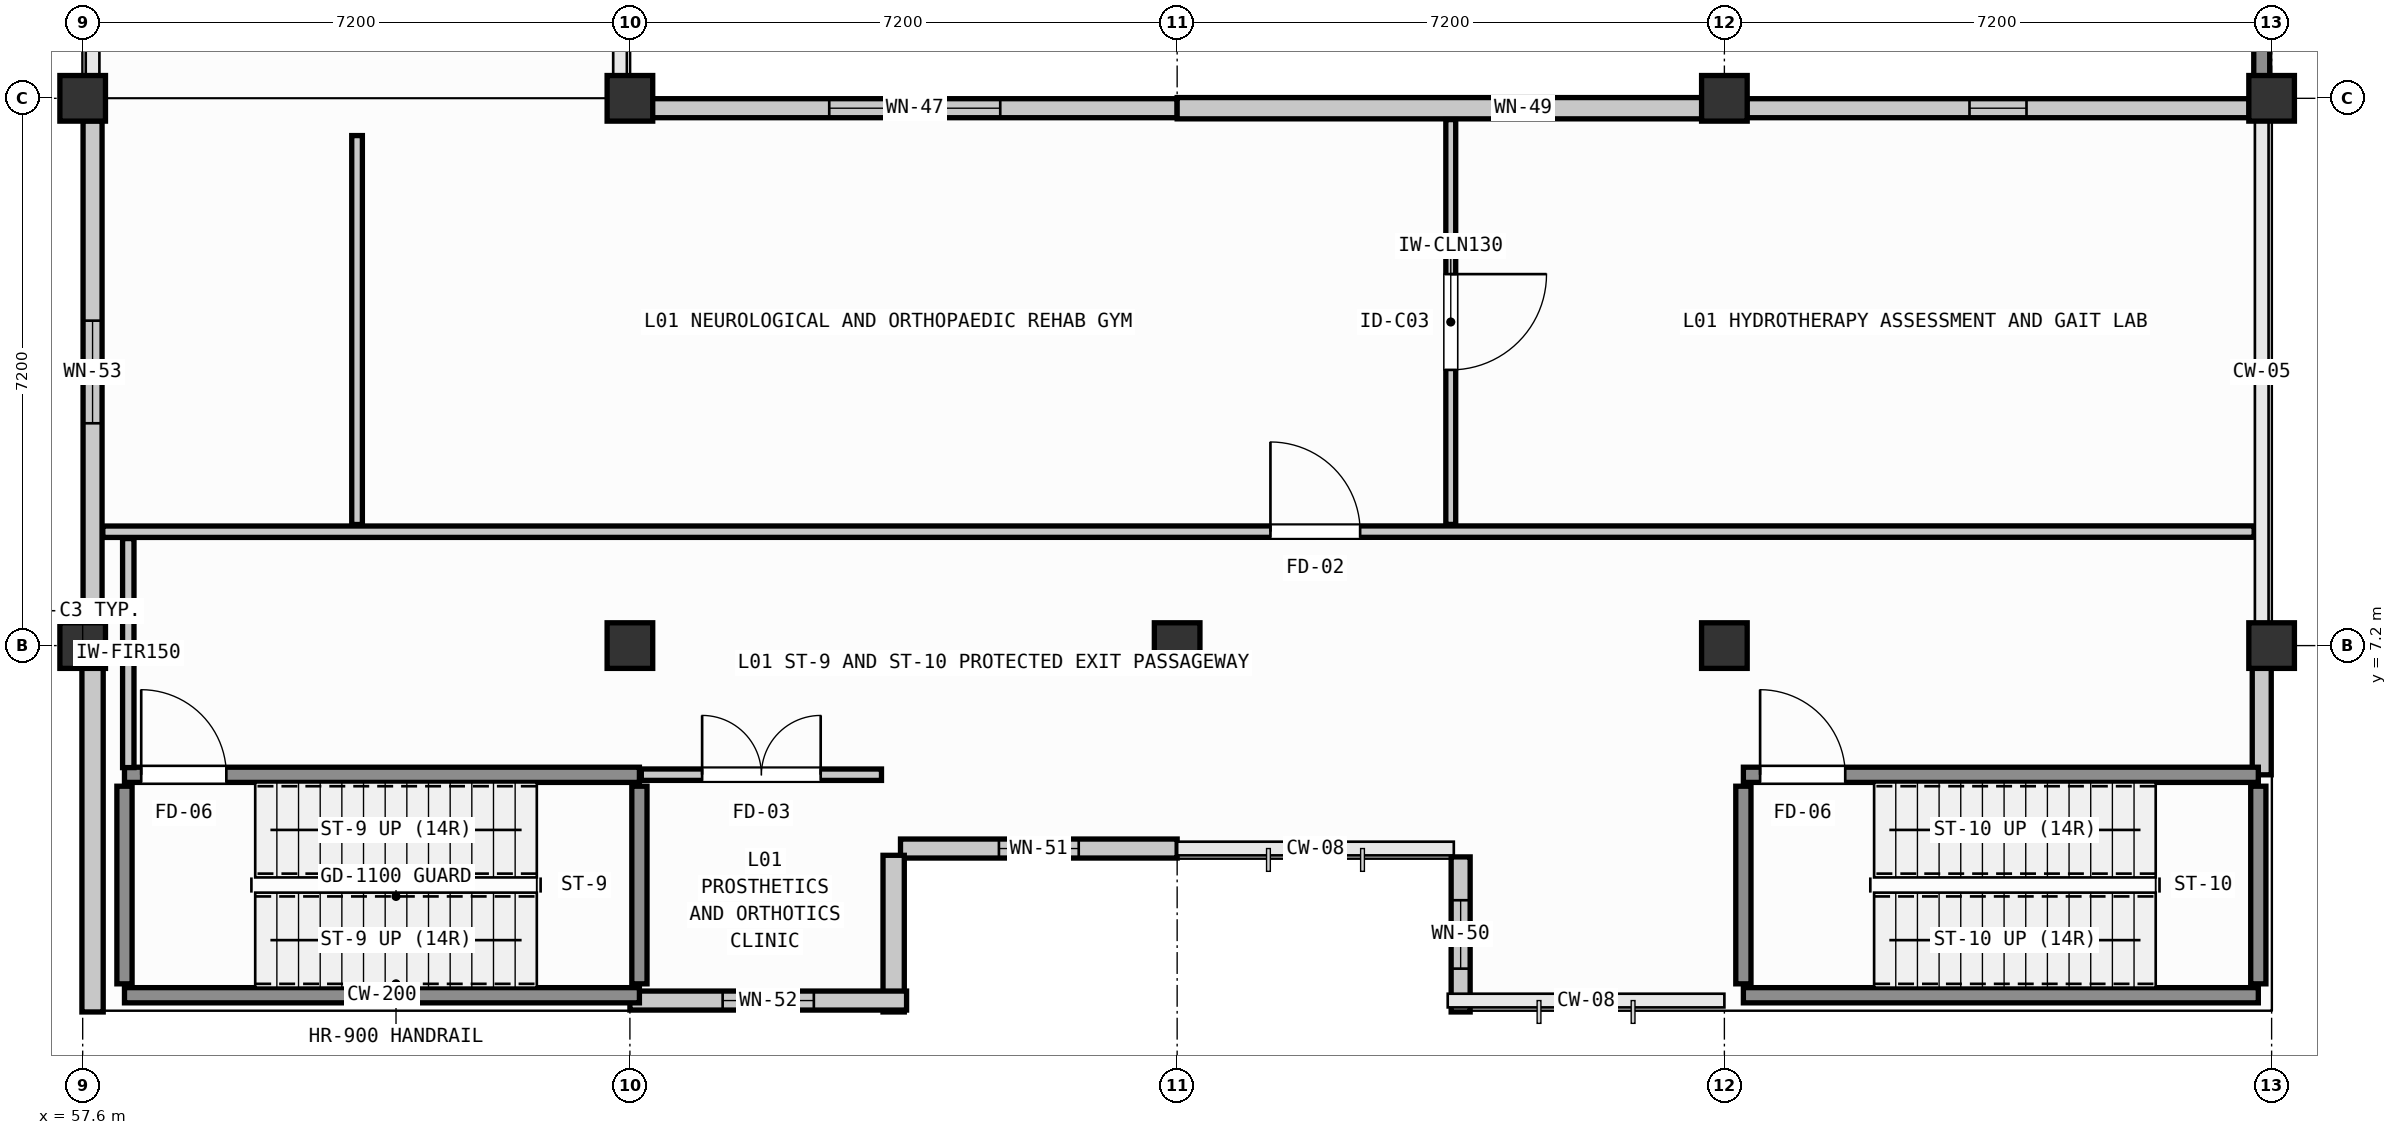
"""IFC4 building model, lengths in metres.
Left out: names, types, materials, properties, quantities, classifications, styles, units other than length and angle.
Written with IfcOpenShell. Run it as: python <this file> out.ifc"""

import sys

from ifc_helpers import new_model, si_unit, direction, frame, frame_2d, origin, origin_2d, place, context, subcontext, project, spatial, rectangle, extrude, element, fill, save


model = new_model("IFC4")
c1 = context("Model", 3, precision=1e-05, world=origin(), true_north=direction((0.0, 1.0)))
c2 = subcontext(c1, "Body", "Model", "MODEL_VIEW")
j1 = project(units=[si_unit("LENGTHUNIT", "METRE"), si_unit("PLANEANGLEUNIT", "RADIAN")], contexts=[c1])
p1 = place(None, origin())
s1 = spatial("IfcSite", under=j1, at=p1, CompositionType="ELEMENT")
p2 = place(p1, origin())
s2 = spatial("IfcBuilding", under=s1, at=p2, CompositionType="ELEMENT")
p3 = place(p2, origin())
s3 = spatial("IfcBuildingStorey", under=s2, at=p3, CompositionType="ELEMENT", Elevation=0.0)
for number, where, z_axis, x_axis in (
    (1, (57.6, 7.2, -0.25), (0.0, 0.0, 1.0), (1.0, 0.0, 0.0)),
    (2, (57.6, 14.4, -0.25), (0.0, 0.0, 1.0), (1.0, 0.0, 0.0)),
    (3, (64.8, 7.2, -0.25), (0.0, 0.0, 1.0), (1.0, 0.0, 0.0)),
    (4, (64.8, 14.4, -0.25), (0.0, 0.0, 1.0), (1.0, 0.0, 0.0)),
    (5, (72.0, 7.2, -0.25), (0.0, 0.0, 1.0), (1.0, 0.0, 0.0)),
    (6, (79.2, 7.2, -0.25), (0.0, 0.0, 1.0), (1.0, 0.0, 0.0)),
    (7, (79.2, 14.4, -0.25), (0.0, 0.0, 1.0), (1.0, 0.0, 0.0)),
    (8, (86.4, 7.2, -0.25), (0.0, 0.0, 1.0), (1.0, 0.0, 0.0)),
    (9, (86.4, 14.4, -0.25), (0.0, 0.0, 1.0), (1.0, 0.0, 0.0)),
):
    element("IfcColumn", number, at=place(p3, frame(where, z_axis=z_axis, x_axis=x_axis)), inside=s3, PredefinedType="COLUMN", context=c2, shape_type="SweptSolid", body=[
        extrude(rectangle(XDim=0.6, YDim=0.6, at=origin_2d()), origin(), (0.0, 0.0, 1.0), 4.865),
    ])
p4 = place(p3, frame((65.095, 14.27, 0.0), z_axis=(0.0, 0.0, 1.0), x_axis=(1.0, 0.0, 0.0)))
e10 = element("IfcWall", 10, at=p4, inside=s3, PredefinedType="SOLIDWALL", context=c2, shape_type="SweptSolid", body=[
    extrude(rectangle(XDim=6.905, YDim=0.25, at=frame_2d((3.453, 0.0))), origin(), (0.0, 0.0, 1.0), 3.915),
])
p5 = place(p4, frame((2.327, 0.0, 0.95)))
e11 = element("IfcOpeningElement", 11, at=p5, cuts=e10, PredefinedType="OPENING", context=c2, shape_type="SweptSolid", body=[
    extrude(rectangle(XDim=2.25, YDim=1.55, at=frame_2d((1.125, 0.775))), frame((0.0, 0.135, 0.0), z_axis=(0.0, -1.0, 0.0), x_axis=(1.0, 0.0, 0.0)), (0.0, 0.0, 1.0), 0.27),
])
p6 = place(p3, frame((72.0, 14.27, 0.0), z_axis=(0.0, 0.0, 1.0), x_axis=(1.0, 0.0, 0.0)))
e12 = element("IfcWall", 12, at=p6, inside=s3, PredefinedType="SOLIDWALL", context=c2, shape_type="SweptSolid", body=[
    extrude(rectangle(XDim=6.905, YDim=0.28, at=frame_2d((3.453, 0.0))), origin(), (0.0, 0.0, 1.0), 3.915),
])
p7 = place(p6, frame((4.177, 0.0, 0.95)))
e13 = element("IfcOpeningElement", 13, at=p7, cuts=e12, PredefinedType="OPENING", context=c2, shape_type="SweptSolid", body=[
    extrude(rectangle(XDim=0.75, YDim=1.85, at=frame_2d((0.375, 0.925))), frame((0.0, 0.15, 0.0), z_axis=(0.0, -1.0, 0.0), x_axis=(1.0, 0.0, 0.0)), (0.0, 0.0, 1.0), 0.3),
])
p8 = place(p3, frame((79.495, 14.27, 0.0), z_axis=(0.0, 0.0, 1.0), x_axis=(1.0, 0.0, 0.0)))
e14 = element("IfcWall", 14, at=p8, inside=s3, PredefinedType="SOLIDWALL", context=c2, shape_type="SweptSolid", body=[
    extrude(rectangle(XDim=6.61, YDim=0.25, at=frame_2d((3.305, 0.0))), origin(), (0.0, 0.0, 1.0), 3.815),
])
p9 = place(p8, frame((2.93, 0.0, 0.95)))
e15 = element("IfcOpeningElement", 15, at=p9, cuts=e14, PredefinedType="OPENING", context=c2, shape_type="SweptSolid", body=[
    extrude(rectangle(XDim=0.75, YDim=1.85, at=frame_2d((0.375, 0.925))), frame((0.0, 0.135, 0.0), z_axis=(0.0, -1.0, 0.0), x_axis=(1.0, 0.0, 0.0)), (0.0, 0.0, 1.0), 0.27),
])
p10 = place(p3, frame((86.27, 6.905, 0.0), z_axis=(0.0, 0.0, 1.0), x_axis=(0.0, -1.0, 0.0)))
e16 = element("IfcWall", 16, at=p10, inside=s3, PredefinedType="SOLIDWALL", context=c2, shape_type="SweptSolid", body=[
    extrude(rectangle(XDim=1.405, YDim=0.25, at=frame_2d((0.703, 0.0))), origin(), (0.0, 0.0, 1.0), 3.815),
])
p11 = place(p3, frame((75.73, 2.38, 0.0), z_axis=(0.0, 0.0, 1.0), x_axis=(0.0, 1.0, 0.0)))
e17 = element("IfcWall", 17, at=p11, inside=s3, PredefinedType="SOLIDWALL", context=c2, shape_type="SweptSolid", body=[
    extrude(rectangle(XDim=2.04, YDim=0.25, at=frame_2d((1.02, 0.0))), origin(), (0.0, 0.0, 1.0), 4.57),
])
p12 = place(p11, frame((0.57, 0.0, 0.95)))
e18 = element("IfcOpeningElement", 18, at=p12, cuts=e17, PredefinedType="OPENING", context=c2, shape_type="SweptSolid", body=[
    extrude(rectangle(XDim=0.9, YDim=1.85, at=frame_2d((0.45, 0.925))), frame((0.0, 0.135, 0.0), z_axis=(0.0, -1.0, 0.0), x_axis=(1.0, 0.0, 0.0)), (0.0, 0.0, 1.0), 0.27),
])
p13 = place(p3, frame((72.0, 4.53, 0.0), z_axis=(0.0, 0.0, 1.0), x_axis=(-1.0, 0.0, 0.0)))
e19 = element("IfcWall", 19, at=p13, inside=s3, PredefinedType="SOLIDWALL", context=c2, shape_type="SweptSolid", body=[
    extrude(rectangle(XDim=3.64, YDim=0.25, at=frame_2d((1.82, 0.0))), origin(), (0.0, 0.0, 1.0), 4.57),
])
p14 = place(p13, frame((1.295, 0.0, 0.95)))
e20 = element("IfcOpeningElement", 20, at=p14, cuts=e19, PredefinedType="OPENING", context=c2, shape_type="SweptSolid", body=[
    extrude(rectangle(XDim=1.05, YDim=1.85, at=frame_2d((0.525, 0.925))), frame((0.0, 0.135, 0.0), z_axis=(0.0, -1.0, 0.0), x_axis=(1.0, 0.0, 0.0)), (0.0, 0.0, 1.0), 0.27),
])
p15 = place(p3, frame((68.27, 4.441, 0.0), z_axis=(0.0, 0.0, 1.0), x_axis=(0.0, -1.0, 0.0)))
e21 = element("IfcWall", 21, at=p15, inside=s3, PredefinedType="SOLIDWALL", context=c2, shape_type="SweptSolid", body=[
    extrude(rectangle(XDim=2.061, YDim=0.28, at=frame_2d((1.031, 0.0))), origin(), (0.0, 0.0, 1.0), 4.57),
])
p16 = place(p3, frame((68.44, 2.53, 0.0), z_axis=(0.0, 0.0, 1.0), x_axis=(-1.0, 0.0, 0.0)))
e22 = element("IfcWall", 22, at=p16, inside=s3, PredefinedType="SOLIDWALL", context=c2, shape_type="SweptSolid", body=[
    extrude(rectangle(XDim=3.64, YDim=0.25, at=frame_2d((1.82, 0.0))), origin(), (0.0, 0.0, 1.0), 4.57),
])
p17 = place(p16, frame((1.22, 0.0, 0.95)))
e23 = element("IfcOpeningElement", 23, at=p17, cuts=e22, PredefinedType="OPENING", context=c2, shape_type="SweptSolid", body=[
    extrude(rectangle(XDim=1.2, YDim=1.85, at=frame_2d((0.6, 0.925))), frame((0.0, 0.135, 0.0), z_axis=(0.0, -1.0, 0.0), x_axis=(1.0, 0.0, 0.0)), (0.0, 0.0, 1.0), 0.27),
])
p18 = place(p3, frame((57.73, 2.38, 0.0), z_axis=(0.0, 0.0, 1.0), x_axis=(0.0, 1.0, 0.0)))
e24 = element("IfcWall", 24, at=p18, inside=s3, PredefinedType="SOLIDWALL", context=c2, shape_type="SweptSolid", body=[
    extrude(rectangle(XDim=4.525, YDim=0.28, at=frame_2d((2.263, 0.0))), origin(), (0.0, 0.0, 1.0), 3.815),
])
p19 = place(p3, frame((57.73, 7.495, 0.0), z_axis=(0.0, 0.0, 1.0), x_axis=(0.0, 1.0, 0.0)))
e25 = element("IfcWall", 25, at=p19, inside=s3, PredefinedType="SOLIDWALL", context=c2, shape_type="SweptSolid", body=[
    extrude(rectangle(XDim=6.61, YDim=0.25, at=frame_2d((3.305, 0.0))), origin(), (0.0, 0.0, 1.0), 3.815),
])
p20 = place(p19, frame((2.63, 0.0, 0.95)))
e26 = element("IfcOpeningElement", 26, at=p20, cuts=e25, PredefinedType="OPENING", context=c2, shape_type="SweptSolid", body=[
    extrude(rectangle(XDim=1.35, YDim=1.85, at=frame_2d((0.675, 0.925))), frame((0.0, 0.135, 0.0), z_axis=(0.0, -1.0, 0.0), x_axis=(1.0, 0.0, 0.0)), (0.0, 0.0, 1.0), 0.27),
])
p21 = place(p3, frame((86.27, 14.5, 0.0), z_axis=(0.0, 0.0, 1.0), x_axis=(0.0, 1.0, 0.0)))
e27 = element("IfcWall", 27, at=p21, inside=s3, PredefinedType="SOLIDWALL", context=c2, shape_type="SweptSolid", body=[
    extrude(rectangle(XDim=5.24, YDim=0.21, at=frame_2d((2.62, 0.0))), origin(), (0.0, 0.0, 1.0), 2.35),
])
p22 = place(p21, frame((1.82, 0.0, 0.0)))
e28 = element("IfcOpeningElement", 28, at=p22, cuts=e27, PredefinedType="OPENING", context=c2, shape_type="SweptSolid", body=[
    extrude(rectangle(XDim=1.6, YDim=2.05, at=frame_2d((0.8, 1.025))), frame((0.0, 0.115, 0.0), z_axis=(0.0, -1.0, 0.0), x_axis=(1.0, 0.0, 0.0)), (0.0, 0.0, 1.0), 0.23),
])
p23 = place(p3, frame((58.15, 2.6, -0.25), z_axis=(0.0, 0.0, 1.0), x_axis=(1.0, 0.0, 0.0)))
e29 = element("IfcWall", 29, at=p23, inside=s3, PredefinedType="SHEAR", context=c2, shape_type="SweptSolid", body=[
    extrude(rectangle(XDim=6.775, YDim=0.2, at=frame_2d((3.388, 0.0))), origin(), (0.0, 0.0, 1.0), 5.05),
])
p24 = place(p3, frame((58.15, 5.5, -0.25), z_axis=(0.0, 0.0, 1.0), x_axis=(1.0, 0.0, 0.0)))
e30 = element("IfcWall", 30, at=p24, inside=s3, PredefinedType="SHEAR", context=c2, shape_type="SweptSolid", body=[
    extrude(rectangle(XDim=6.775, YDim=0.2, at=frame_2d((3.388, 0.0))), origin(), (0.0, 0.0, 1.0), 5.05),
])
p25 = place(p24, frame((0.22, 0.0, 0.25)))
e31 = element("IfcOpeningElement", 31, at=p25, cuts=e30, PredefinedType="OPENING", context=c2, shape_type="SweptSolid", body=[
    extrude(rectangle(XDim=1.12, YDim=2.14, at=frame_2d((0.56, 1.07))), frame((0.0, 0.11, 0.0), z_axis=(0.0, -1.0, 0.0), x_axis=(1.0, 0.0, 0.0)), (0.0, 0.0, 1.0), 0.22),
])
for number, where, z_axis, x_axis in (
    (32, (58.15, 2.75, -0.25), (0.0, 0.0, 1.0), (0.0, 1.0, 0.0)),
    (33, (64.925, 2.75, -0.25), (0.0, 0.0, 1.0), (0.0, 1.0, 0.0)),
):
    element("IfcWall", number, at=place(p3, frame(where, z_axis=z_axis, x_axis=x_axis)), inside=s3, PredefinedType="SHEAR", context=c2, shape_type="SweptSolid", body=[
        extrude(rectangle(XDim=2.6, YDim=0.2, at=frame_2d((1.3, 0.0))), origin(), (0.0, 0.0, 1.0), 5.05),
    ])
p26 = place(p3, frame((79.45, 2.6, -0.25), z_axis=(0.0, 0.0, 1.0), x_axis=(1.0, 0.0, 0.0)))
e34 = element("IfcWall", 34, at=p26, inside=s3, PredefinedType="SHEAR", context=c2, shape_type="SweptSolid", body=[
    extrude(rectangle(XDim=6.775, YDim=0.2, at=frame_2d((3.388, 0.0))), origin(), (0.0, 0.0, 1.0), 5.05),
])
p27 = place(p3, frame((79.45, 5.5, -0.25), z_axis=(0.0, 0.0, 1.0), x_axis=(1.0, 0.0, 0.0)))
e35 = element("IfcWall", 35, at=p27, inside=s3, PredefinedType="SHEAR", context=c2, shape_type="SweptSolid", body=[
    extrude(rectangle(XDim=6.775, YDim=0.2, at=frame_2d((3.388, 0.0))), origin(), (0.0, 0.0, 1.0), 5.05),
])
p28 = place(p27, frame((0.22, 0.0, 0.25)))
e36 = element("IfcOpeningElement", 36, at=p28, cuts=e35, PredefinedType="OPENING", context=c2, shape_type="SweptSolid", body=[
    extrude(rectangle(XDim=1.12, YDim=2.14, at=frame_2d((0.56, 1.07))), frame((0.0, 0.11, 0.0), z_axis=(0.0, -1.0, 0.0), x_axis=(1.0, 0.0, 0.0)), (0.0, 0.0, 1.0), 0.22),
])
for number, where, z_axis, x_axis in (
    (37, (79.45, 2.75, -0.25), (0.0, 0.0, 1.0), (0.0, 1.0, 0.0)),
    (38, (86.225, 2.75, -0.25), (0.0, 0.0, 1.0), (0.0, 1.0, 0.0)),
):
    element("IfcWall", number, at=place(p3, frame(where, z_axis=z_axis, x_axis=x_axis)), inside=s3, PredefinedType="SHEAR", context=c2, shape_type="SweptSolid", body=[
        extrude(rectangle(XDim=2.6, YDim=0.2, at=frame_2d((1.3, 0.0))), origin(), (0.0, 0.0, 1.0), 5.05),
    ])
p29 = place(p3, frame((58.2, 5.595, 0.0), z_axis=(0.0, 0.0, 1.0), x_axis=(0.0, 1.0, 0.0)))
e39 = element("IfcWall", 39, at=p29, inside=s3, PredefinedType="PARTITIONING", context=c2, shape_type="SweptSolid", body=[
    extrude(rectangle(XDim=3.013, YDim=0.15, at=frame_2d((1.506, 0.0))), origin(), (0.0, 0.0, 1.0), 3.815),
])
p30 = place(p3, frame((57.865, 8.698, 0.0), z_axis=(0.0, 0.0, 1.0), x_axis=(0.999999997619, 6.9002993e-05, 0.0)))
e40 = element("IfcWall", 40, at=p30, inside=s3, PredefinedType="PARTITIONING", context=c2, shape_type="SweptSolid", body=[
    extrude(rectangle(XDim=28.305, YDim=0.15, at=frame_2d((14.152, 0.0))), origin(), (0.0, 0.0, 1.0), 3.915),
])
p31 = place(p30, frame((15.363, 0.0, 0.0)))
e41 = element("IfcOpeningElement", 41, at=p31, cuts=e40, PredefinedType="OPENING", context=c2, shape_type="SweptSolid", body=[
    extrude(rectangle(XDim=1.18, YDim=2.16, at=frame_2d((0.59, 1.08))), frame((0.0, 0.085, 0.0), z_axis=(0.0, -1.0, 0.0), x_axis=(1.0, 0.0, 0.0)), (0.0, 0.0, 1.0), 0.17),
])
p32 = place(p3, frame((75.6, 14.12, 0.0), z_axis=(0.0, 0.0, 1.0), x_axis=(0.0, -1.0, 0.0)))
e42 = element("IfcWall", 42, at=p32, inside=s3, PredefinedType="PARTITIONING", context=c2, shape_type="SweptSolid", body=[
    extrude(rectangle(XDim=5.326, YDim=0.13, at=frame_2d((2.663, 0.0))), origin(), (0.0, 0.0, 1.0), 4.57),
])
p33 = place(p32, frame((2.033, 0.0, 0.0)))
e43 = element("IfcOpeningElement", 43, at=p33, cuts=e42, PredefinedType="OPENING", context=c2, shape_type="SweptSolid", body=[
    extrude(rectangle(XDim=1.26, YDim=2.28, at=frame_2d((0.63, 1.14))), frame((0.0, 0.075, 0.0), z_axis=(0.0, -1.0, 0.0), x_axis=(1.0, 0.0, 0.0)), (0.0, 0.0, 1.0), 0.15),
])
p34 = place(p3, frame((61.21, 8.793, 0.0), z_axis=(0.0, 0.0, 1.0), x_axis=(0.0, 1.0, 0.0)))
e44 = element("IfcWall", 44, at=p34, inside=s3, PredefinedType="PARTITIONING", context=c2, shape_type="SweptSolid", body=[
    extrude(rectangle(XDim=5.117, YDim=0.14, at=frame_2d((2.558, 0.0))), origin(), (0.0, 0.0, 1.0), 4.57),
])
p35 = place(p3, frame((64.95, 5.502, 0.0), z_axis=(0.0, 0.0, 1.0), x_axis=(0.999999988063, -0.000154511741, 0.0)))
e45 = element("IfcWall", 45, at=p35, inside=s3, PredefinedType="PARTITIONING", context=c2, shape_type="SweptSolid", body=[
    extrude(rectangle(XDim=3.16, YDim=0.15, at=frame_2d((1.58, 0.0))), origin(), (0.0, 0.0, 1.0), 4.57),
])
p36 = place(p35, frame((0.8, 0.0, 0.0)))
e46 = element("IfcOpeningElement", 46, at=p36, cuts=e45, PredefinedType="OPENING", context=c2, shape_type="SweptSolid", body=[
    extrude(rectangle(XDim=1.56, YDim=2.22, at=frame_2d((0.78, 1.11))), frame((0.0, 0.085, 0.0), z_axis=(0.0, -1.0, 0.0), x_axis=(1.0, 0.0, 0.0)), (0.0, 0.0, 1.0), 0.17),
])
p37 = place(p5, origin())
e47 = element("IfcWindow", 47, at=p37, inside=s3, PartitioningType="SINGLE_PANEL", PredefinedType="WINDOW", context=c2, shape_type="SweptSolid", body=[
    extrude(rectangle(XDim=2.25, YDim=1.55, at=frame_2d((1.125, 0.775))), frame((0.0, 0.03, 0.0), z_axis=(0.0, -1.0, 0.0), x_axis=(1.0, 0.0, 0.0)), (0.0, 0.0, 1.0), 0.06),
])
fill(e11, e47)
p38 = place(p7, origin())
e48 = element("IfcWindow", 48, at=p38, inside=s3, PartitioningType="SINGLE_PANEL", PredefinedType="WINDOW", context=c2, shape_type="SweptSolid", body=[
    extrude(rectangle(XDim=0.75, YDim=1.85, at=frame_2d((0.375, 0.925))), frame((0.0, 0.03, 0.0), z_axis=(0.0, -1.0, 0.0), x_axis=(1.0, 0.0, 0.0)), (0.0, 0.0, 1.0), 0.06),
])
fill(e13, e48)
p39 = place(p9, origin())
e49 = element("IfcWindow", 49, at=p39, inside=s3, PartitioningType="SINGLE_PANEL", PredefinedType="WINDOW", context=c2, shape_type="SweptSolid", body=[
    extrude(rectangle(XDim=0.75, YDim=1.85, at=frame_2d((0.375, 0.925))), frame((0.0, 0.03, 0.0), z_axis=(0.0, -1.0, 0.0), x_axis=(1.0, 0.0, 0.0)), (0.0, 0.0, 1.0), 0.06),
])
fill(e15, e49)
p40 = place(p12, origin())
e50 = element("IfcWindow", 50, at=p40, inside=s3, PartitioningType="SINGLE_PANEL", PredefinedType="WINDOW", context=c2, shape_type="SweptSolid", body=[
    extrude(rectangle(XDim=0.9, YDim=1.85, at=frame_2d((0.45, 0.925))), frame((0.0, 0.03, 0.0), z_axis=(0.0, -1.0, 0.0), x_axis=(1.0, 0.0, 0.0)), (0.0, 0.0, 1.0), 0.06),
])
fill(e18, e50)
p41 = place(p14, origin())
e51 = element("IfcWindow", 51, at=p41, inside=s3, PartitioningType="SINGLE_PANEL", PredefinedType="WINDOW", context=c2, shape_type="SweptSolid", body=[
    extrude(rectangle(XDim=1.05, YDim=1.85, at=frame_2d((0.525, 0.925))), frame((0.0, 0.03, 0.0), z_axis=(0.0, -1.0, 0.0), x_axis=(1.0, 0.0, 0.0)), (0.0, 0.0, 1.0), 0.06),
])
fill(e20, e51)
p42 = place(p17, origin())
e52 = element("IfcWindow", 52, at=p42, inside=s3, PartitioningType="SINGLE_PANEL", PredefinedType="WINDOW", context=c2, shape_type="SweptSolid", body=[
    extrude(rectangle(XDim=1.2, YDim=1.85, at=frame_2d((0.6, 0.925))), frame((0.0, 0.03, 0.0), z_axis=(0.0, -1.0, 0.0), x_axis=(1.0, 0.0, 0.0)), (0.0, 0.0, 1.0), 0.06),
])
fill(e23, e52)
p43 = place(p20, origin())
e53 = element("IfcWindow", 53, at=p43, inside=s3, PartitioningType="SINGLE_PANEL", PredefinedType="WINDOW", context=c2, shape_type="SweptSolid", body=[
    extrude(rectangle(XDim=1.35, YDim=1.85, at=frame_2d((0.675, 0.925))), frame((0.0, 0.03, 0.0), z_axis=(0.0, -1.0, 0.0), x_axis=(1.0, 0.0, 0.0)), (0.0, 0.0, 1.0), 0.06),
])
fill(e26, e53)
p44 = place(p25, origin())
e54 = element("IfcDoor", 54, at=p44, inside=s3, OperationType="SINGLE_SWING_RIGHT", PredefinedType="DOOR", context=c2, shape_type="SweptSolid", body=[
    extrude(rectangle(XDim=1.12, YDim=2.14, at=frame_2d((0.56, 1.07))), frame((0.0, 0.025, 0.0), z_axis=(0.0, -1.0, 0.0), x_axis=(1.0, 0.0, 0.0)), (0.0, 0.0, 1.0), 0.05),
])
fill(e31, e54)
p45 = place(p28, origin())
e55 = element("IfcDoor", 55, at=p45, inside=s3, OperationType="SINGLE_SWING_RIGHT", PredefinedType="DOOR", context=c2, shape_type="SweptSolid", body=[
    extrude(rectangle(XDim=1.12, YDim=2.14, at=frame_2d((0.56, 1.07))), frame((0.0, 0.025, 0.0), z_axis=(0.0, -1.0, 0.0), x_axis=(1.0, 0.0, 0.0)), (0.0, 0.0, 1.0), 0.05),
])
fill(e36, e55)
p46 = place(p31, origin())
e56 = element("IfcDoor", 56, at=p46, inside=s3, OperationType="SINGLE_SWING_LEFT", PredefinedType="DOOR", context=c2, shape_type="SweptSolid", body=[
    extrude(rectangle(XDim=1.18, YDim=2.16, at=frame_2d((0.59, 1.08))), frame((0.0, 0.025, 0.0), z_axis=(0.0, -1.0, 0.0), x_axis=(1.0, 0.0, 0.0)), (0.0, 0.0, 1.0), 0.05),
])
fill(e41, e56)
p47 = place(p33, origin())
e57 = element("IfcDoor", 57, at=p47, inside=s3, OperationType="SINGLE_SWING_RIGHT", PredefinedType="DOOR", context=c2, shape_type="SweptSolid", body=[
    extrude(rectangle(XDim=1.26, YDim=2.28, at=frame_2d((0.63, 1.14))), frame((0.0, 0.025, 0.0), z_axis=(0.0, -1.0, 0.0), x_axis=(1.0, 0.0, 0.0)), (0.0, 0.0, 1.0), 0.05),
])
fill(e43, e57)
p48 = place(p36, origin())
e58 = element("IfcDoor", 58, at=p48, inside=s3, OperationType="DOUBLE_DOOR_SINGLE_SWING", PredefinedType="DOOR", context=c2, shape_type="SweptSolid", body=[
    extrude(rectangle(XDim=1.56, YDim=2.22, at=frame_2d((0.78, 1.11))), frame((0.0, 0.025, 0.0), z_axis=(0.0, -1.0, 0.0), x_axis=(1.0, 0.0, 0.0)), (0.0, 0.0, 1.0), 0.05),
])
fill(e46, e58)
save(model, sys.argv[1])
